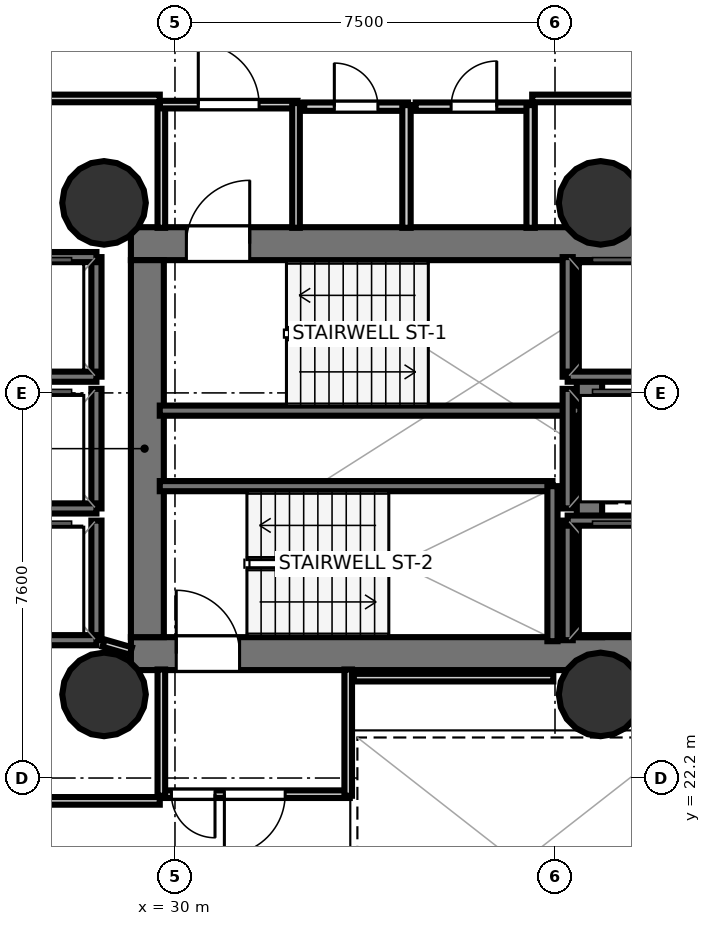
"""IFC4 building model, lengths in metres.
Left out: names, types, materials, properties, quantities, classifications, styles, units other than length and angle.
Written with IfcOpenShell. Run it as: python <this file> out.ifc"""

import sys

from ifc_helpers import new_model, si_unit, direction, frame, frame_2d, origin, origin_2d, place, context, subcontext, project, spatial, rectangle, hollow_circle, extrude, element, fill, save


model = new_model("IFC4")
c1 = context("Model", 3, precision=1e-05, world=origin(), true_north=direction((0.0, 1.0)))
c2 = subcontext(c1, "Body", "Model", "MODEL_VIEW")
j1 = project(units=[si_unit("LENGTHUNIT", "METRE"), si_unit("PLANEANGLEUNIT", "RADIAN")], contexts=[c1])
p1 = place(None, origin())
s1 = spatial("IfcSite", under=j1, at=p1, CompositionType="ELEMENT")
p2 = place(p1, origin())
s2 = spatial("IfcBuilding", under=s1, at=p2, CompositionType="ELEMENT")
p3 = place(p2, frame((0.0, 0.0, 85.8)))
s3 = spatial("IfcBuildingStorey", under=s2, at=p3, CompositionType="ELEMENT", Elevation=85.8)
p4 = place(p3, frame((29.13, 32.745, 0.0), z_axis=(0.0, 0.0, 1.0), x_axis=(1.0, 0.0, 0.0)))
e1 = element("IfcWall", 1, at=p4, inside=s3, PredefinedType="SHEAR", context=c2, shape_type="SweptSolid", body=[
    extrude(rectangle(XDim=10.72, YDim=0.65, at=frame_2d((5.36, 0.0))), origin(), (0.0, 0.0, 1.0), 3.52),
])
p5 = place(p4, frame((1.095, 0.0, 0.0)))
e2 = element("IfcOpeningElement", 2, at=p5, cuts=e1, PredefinedType="OPENING", context=c2, shape_type="SweptSolid", body=[
    extrude(rectangle(XDim=1.25, YDim=2.15, at=frame_2d((0.625, 1.075))), frame((0.0, 0.335, 0.0), z_axis=(0.0, -1.0, 0.0), x_axis=(1.0, 0.0, 0.0)), (0.0, 0.0, 1.0), 0.67),
])
p6 = place(p3, frame((29.13, 24.655, 0.0), z_axis=(0.0, 0.0, 1.0), x_axis=(1.0, 0.0, 0.0)))
e3 = element("IfcWall", 3, at=p6, inside=s3, PredefinedType="SHEAR", context=c2, shape_type="SweptSolid", body=[
    extrude(rectangle(XDim=10.72, YDim=0.65, at=frame_2d((5.36, 0.0))), origin(), (0.0, 0.0, 1.0), 3.52),
])
p7 = place(p6, frame((0.895, 0.0, 0.0)))
e4 = element("IfcOpeningElement", 4, at=p7, cuts=e3, PredefinedType="OPENING", context=c2, shape_type="SweptSolid", body=[
    extrude(rectangle(XDim=1.25, YDim=2.15, at=frame_2d((0.625, 1.075))), frame((0.0, 0.335, 0.0), z_axis=(0.0, -1.0, 0.0), x_axis=(1.0, 0.0, 0.0)), (0.0, 0.0, 1.0), 0.67),
])
p8 = place(p3, frame((29.455, 24.98, 0.0), z_axis=(0.0, 0.0, 1.0), x_axis=(0.0, 1.0, 0.0)))
e5 = element("IfcWall", 5, at=p8, inside=s3, PredefinedType="SHEAR", context=c2, shape_type="SweptSolid", body=[
    extrude(rectangle(XDim=7.44, YDim=0.65, at=frame_2d((3.72, 0.0))), origin(), (0.0, 0.0, 1.0), 3.52),
])
p9 = place(p3, frame((38.18, 24.98, 0.0), z_axis=(0.0, 0.0, 1.0), x_axis=(0.0, 1.0, 0.0)))
e6 = element("IfcWall", 6, at=p9, inside=s3, PredefinedType="SHEAR", context=c2, shape_type="SweptSolid", body=[
    extrude(rectangle(XDim=7.44, YDim=0.5, at=frame_2d((3.72, 0.0))), origin(), (0.0, 0.0, 1.0), 3.52),
])
for number, where, z_axis, x_axis in (
    (7, (28.6, 33.55, 0.0), (0.0, 0.0, 1.0), (1.0, 0.0, 0.0)),
    (8, (28.6, 23.85, 0.0), (0.0, 0.0, 1.0), (1.0, 0.0, 0.0)),
    (9, (38.4, 33.55, 0.0), (0.0, 0.0, 1.0), (1.0, 0.0, 0.0)),
    (10, (38.4, 23.85, 0.0), (0.0, 0.0, 1.0), (1.0, 0.0, 0.0)),
):
    element("IfcColumn", number, at=place(p3, frame(where, z_axis=z_axis, x_axis=x_axis)), inside=s3, PredefinedType="COLUMN", context=c2, shape_type="SweptSolid", body=[
        extrude(hollow_circle(Radius=0.825, WallThickness=0.04, at=origin_2d()), origin(), (0.0, 0.0, 1.0), 3.7),
    ])
p10 = place(p3, frame((29.7, 29.45, 0.0), z_axis=(0.0, 0.0, 1.0), x_axis=(1.0, 0.0, 0.0)))
e11 = element("IfcWall", 11, at=p10, inside=s3, PredefinedType="SOLIDWALL", context=c2, shape_type="SweptSolid", body=[
    extrude(rectangle(XDim=8.3, YDim=0.2, at=frame_2d((4.15, 0.0))), origin(), (0.0, 0.0, 1.0), 3.52),
])
p11 = place(p3, frame((29.7, 27.96, 0.0), z_axis=(0.0, 0.0, 1.0), x_axis=(1.0, 0.0, 0.0)))
e12 = element("IfcWall", 12, at=p11, inside=s3, PredefinedType="SOLIDWALL", context=c2, shape_type="SweptSolid", body=[
    extrude(rectangle(XDim=7.75, YDim=0.2, at=frame_2d((3.875, 0.0))), origin(), (0.0, 0.0, 1.0), 3.52),
])
p12 = place(p3, frame((37.45, 24.9, 0.0), z_axis=(0.0, 0.0, 1.0), x_axis=(0.0, 1.0, 0.0)))
e13 = element("IfcWall", 13, at=p12, inside=s3, PredefinedType="SOLIDWALL", context=c2, shape_type="SweptSolid", body=[
    extrude(rectangle(XDim=3.06, YDim=0.2, at=frame_2d((1.53, 0.0))), origin(), (0.0, 0.0, 1.0), 3.52),
])
p13 = place(p3, frame((37.75, 30.12, 0.0), z_axis=(0.0, 0.0, 1.0), x_axis=(0.0, 1.0, 0.0)))
e14 = element("IfcWall", 14, at=p13, inside=s3, PredefinedType="SOLIDWALL", context=c2, shape_type="SweptSolid", body=[
    extrude(rectangle(XDim=2.36, YDim=0.2, at=frame_2d((1.18, 0.0))), origin(), (0.0, 0.0, 1.0), 3.52),
])
p14 = place(p3, frame((37.75, 30.12, 0.0), z_axis=(0.0, 0.0, 1.0), x_axis=(1.0, 0.0, 0.0)))
e15 = element("IfcWall", 15, at=p14, inside=s3, PredefinedType="SOLIDWALL", context=c2, shape_type="SweptSolid", body=[
    extrude(rectangle(XDim=2.1, YDim=0.2, at=frame_2d((1.05, 0.0))), origin(), (0.0, 0.0, 1.0), 3.52),
])
p15 = place(p3, frame((37.75, 24.92, 0.0), z_axis=(0.0, 0.0, 1.0), x_axis=(0.0, 1.0, 0.0)))
e16 = element("IfcWall", 16, at=p15, inside=s3, PredefinedType="SOLIDWALL", context=c2, shape_type="SweptSolid", body=[
    extrude(rectangle(XDim=2.36, YDim=0.2, at=frame_2d((1.18, 0.0))), origin(), (0.0, 0.0, 1.0), 3.52),
])
p16 = place(p3, frame((37.75, 27.28, 0.0), z_axis=(0.0, 0.0, 1.0), x_axis=(1.0, 0.0, 0.0)))
e17 = element("IfcWall", 17, at=p16, inside=s3, PredefinedType="SOLIDWALL", context=c2, shape_type="SweptSolid", body=[
    extrude(rectangle(XDim=2.1, YDim=0.2, at=frame_2d((1.05, 0.0))), origin(), (0.0, 0.0, 1.0), 3.52),
])
p17 = place(p3, frame((28.45, 30.12, 0.0), z_axis=(0.0, 0.0, 1.0), x_axis=(0.0, 1.0, 0.0)))
e18 = element("IfcWall", 18, at=p17, inside=s3, PredefinedType="SOLIDWALL", context=c2, shape_type="SweptSolid", body=[
    extrude(rectangle(XDim=2.36, YDim=0.2, at=frame_2d((1.18, 0.0))), origin(), (0.0, 0.0, 1.0), 3.52),
])
for number, where, z_axis, x_axis in (
    (19, (26.35, 32.48, 0.0), (0.0, 0.0, 1.0), (1.0, 0.0, 0.0)),
    (20, (26.35, 30.12, 0.0), (0.0, 0.0, 1.0), (1.0, 0.0, 0.0)),
):
    element("IfcWall", number, at=place(p3, frame(where, z_axis=z_axis, x_axis=x_axis)), inside=s3, PredefinedType="SOLIDWALL", context=c2, shape_type="SweptSolid", body=[
        extrude(rectangle(XDim=2.1, YDim=0.2, at=frame_2d((1.05, 0.0))), origin(), (0.0, 0.0, 1.0), 3.52),
    ])
p18 = place(p3, frame((28.45, 27.52, 0.0), z_axis=(0.0, 0.0, 1.0), x_axis=(0.0, 1.0, 0.0)))
e21 = element("IfcWall", 21, at=p18, inside=s3, PredefinedType="SOLIDWALL", context=c2, shape_type="SweptSolid", body=[
    extrude(rectangle(XDim=2.36, YDim=0.2, at=frame_2d((1.18, 0.0))), origin(), (0.0, 0.0, 1.0), 3.52),
])
p19 = place(p3, frame((26.35, 27.52, 0.0), z_axis=(0.0, 0.0, 1.0), x_axis=(1.0, 0.0, 0.0)))
e22 = element("IfcWall", 22, at=p19, inside=s3, PredefinedType="SOLIDWALL", context=c2, shape_type="SweptSolid", body=[
    extrude(rectangle(XDim=2.1, YDim=0.2, at=frame_2d((1.05, 0.0))), origin(), (0.0, 0.0, 1.0), 3.52),
])
p20 = place(p3, frame((28.45, 24.92, 0.0), z_axis=(0.0, 0.0, 1.0), x_axis=(0.0, 1.0, 0.0)))
e23 = element("IfcWall", 23, at=p20, inside=s3, PredefinedType="SOLIDWALL", context=c2, shape_type="SweptSolid", body=[
    extrude(rectangle(XDim=2.36, YDim=0.2, at=frame_2d((1.18, 0.0))), origin(), (0.0, 0.0, 1.0), 3.52),
])
p21 = place(p3, frame((26.35, 24.92, 0.0), z_axis=(0.0, 0.0, 1.0), x_axis=(1.0, 0.0, 0.0)))
e24 = element("IfcWall", 24, at=p21, inside=s3, PredefinedType="SOLIDWALL", context=c2, shape_type="SweptSolid", body=[
    extrude(rectangle(XDim=2.1, YDim=0.2, at=frame_2d((1.05, 0.0))), origin(), (0.0, 0.0, 1.0), 3.52),
])
p22 = place(p3, frame((37.75, 27.52, 0.0), z_axis=(0.0, 0.0, 1.0), x_axis=(0.0, 1.0, 0.0)))
e25 = element("IfcWall", 25, at=p22, inside=s3, PredefinedType="SOLIDWALL", context=c2, shape_type="SweptSolid", body=[
    extrude(rectangle(XDim=2.36, YDim=0.2, at=frame_2d((1.18, 0.0))), origin(), (0.0, 0.0, 1.0), 3.52),
])
p23 = place(p3, frame((29.731, 33.058, 0.0), z_axis=(0.0, 0.0, 1.0), x_axis=(0.0, 1.0, 0.0)))
e26 = element("IfcWall", 26, at=p23, inside=s3, PredefinedType="PARTITIONING", context=c2, shape_type="SweptSolid", body=[
    extrude(rectangle(XDim=2.462, YDim=0.15, at=frame_2d((1.231, 0.0))), origin(), (0.0, 0.0, 1.0), 2.84),
])
p24 = place(p3, frame((29.7, 35.489, 0.0), z_axis=(0.0, 0.0, 1.0), x_axis=(1.0, 0.0, 0.0)))
e27 = element("IfcWall", 27, at=p24, inside=s3, PredefinedType="PARTITIONING", context=c2, shape_type="SweptSolid", body=[
    extrude(rectangle(XDim=2.72, YDim=0.15, at=frame_2d((1.36, 0.0))), origin(), (0.0, 0.0, 1.0), 2.84),
])
p25 = place(p24, frame((0.76, 0.0, 0.0)))
e28 = element("IfcOpeningElement", 28, at=p25, cuts=e27, PredefinedType="OPENING", context=c2, shape_type="SweptSolid", body=[
    extrude(rectangle(XDim=1.2, YDim=2.15, at=frame_2d((0.6, 1.075))), frame((0.0, 0.085, 0.0), z_axis=(0.0, -1.0, 0.0), x_axis=(1.0, 0.0, 0.0)), (0.0, 0.0, 1.0), 0.17),
])
p26 = place(p3, frame((32.389, 35.52, 0.0), z_axis=(0.0, 0.0, 1.0), x_axis=(0.0, -1.0, 0.0)))
e29 = element("IfcWall", 29, at=p26, inside=s3, PredefinedType="PARTITIONING", context=c2, shape_type="SweptSolid", body=[
    extrude(rectangle(XDim=2.462, YDim=0.15, at=frame_2d((1.231, 0.0))), origin(), (0.0, 0.0, 1.0), 2.84),
])
p27 = place(p3, frame((33.45, 21.881, 0.0), z_axis=(0.0, 0.0, 1.0), x_axis=(-1.0, 0.0, 0.0)))
e30 = element("IfcWall", 30, at=p27, inside=s3, PredefinedType="PARTITIONING", context=c2, shape_type="SweptSolid", body=[
    extrude(rectangle(XDim=3.75, YDim=0.15, at=frame_2d((1.875, 0.0))), origin(), (0.0, 0.0, 1.0), 2.84),
])
p28 = place(p27, frame((1.275, 0.0, 0.0)))
e31 = element("IfcOpeningElement", 31, at=p28, cuts=e30, PredefinedType="OPENING", context=c2, shape_type="SweptSolid", body=[
    extrude(rectangle(XDim=1.2, YDim=2.15, at=frame_2d((0.6, 1.075))), frame((0.0, 0.085, 0.0), z_axis=(0.0, -1.0, 0.0), x_axis=(1.0, 0.0, 0.0)), (0.0, 0.0, 1.0), 0.17),
])
p29 = place(p27, frame((2.66, 0.0, 0.0)))
e32 = element("IfcOpeningElement", 32, at=p29, cuts=e30, PredefinedType="OPENING", context=c2, shape_type="SweptSolid", body=[
    extrude(rectangle(XDim=0.86, YDim=2.05, at=frame_2d((0.43, 1.025))), frame((0.0, 0.085, 0.0), z_axis=(0.0, -1.0, 0.0), x_axis=(1.0, 0.0, 0.0)), (0.0, 0.0, 1.0), 0.17),
])
for number, where, z_axis, x_axis in (
    (33, (29.731, 21.85, 0.0), (0.0, 0.0, 1.0), (0.0, 1.0, 0.0)),
    (34, (33.419, 24.342, 0.0), (0.0, 0.0, 1.0), (0.0, -1.0, 0.0)),
):
    element("IfcWall", number, at=place(p3, frame(where, z_axis=z_axis, x_axis=x_axis)), inside=s3, PredefinedType="PARTITIONING", context=c2, shape_type="SweptSolid", body=[
        extrude(rectangle(XDim=2.492, YDim=0.15, at=frame_2d((1.246, 0.0))), origin(), (0.0, 0.0, 1.0), 2.84),
    ])
p30 = place(p3, frame((32.55, 35.449, 0.0), z_axis=(0.0, 0.0, 1.0), x_axis=(1.0, 0.0, 0.0)))
e35 = element("IfcWall", 35, at=p30, inside=s3, PredefinedType="PLUMBINGWALL", context=c2, shape_type="SweptSolid", body=[
    extrude(rectangle(XDim=2.05, YDim=0.165, at=frame_2d((1.025, 0.0))), origin(), (0.0, 0.0, 1.0), 2.84),
])
p31 = place(p30, frame((0.595, 0.0, 0.0)))
e36 = element("IfcOpeningElement", 36, at=p31, cuts=e35, PredefinedType="OPENING", context=c2, shape_type="SweptSolid", body=[
    extrude(rectangle(XDim=0.86, YDim=2.05, at=frame_2d((0.43, 1.025))), frame((0.0, 0.093, 0.0), z_axis=(0.0, -1.0, 0.0), x_axis=(1.0, 0.0, 0.0)), (0.0, 0.0, 1.0), 0.185),
])
p32 = place(p3, frame((34.569, 35.48, 0.0), z_axis=(0.0, 0.0, 1.0), x_axis=(0.0, -1.0, 0.0)))
e37 = element("IfcWall", 37, at=p32, inside=s3, PredefinedType="PLUMBINGWALL", context=c2, shape_type="SweptSolid", body=[
    extrude(rectangle(XDim=2.422, YDim=0.165, at=frame_2d((1.211, 0.0))), origin(), (0.0, 0.0, 1.0), 2.84),
])
p33 = place(p3, frame((34.75, 35.449, 0.0), z_axis=(0.0, 0.0, 1.0), x_axis=(1.0, 0.0, 0.0)))
e38 = element("IfcWall", 38, at=p33, inside=s3, PredefinedType="PLUMBINGWALL", context=c2, shape_type="SweptSolid", body=[
    extrude(rectangle(XDim=2.3, YDim=0.165, at=frame_2d((1.15, 0.0))), origin(), (0.0, 0.0, 1.0), 2.84),
])
p34 = place(p33, frame((0.7, 0.0, 0.0)))
e39 = element("IfcOpeningElement", 39, at=p34, cuts=e38, PredefinedType="OPENING", context=c2, shape_type="SweptSolid", body=[
    extrude(rectangle(XDim=0.9, YDim=2.1, at=frame_2d((0.45, 1.05))), frame((0.0, 0.093, 0.0), z_axis=(0.0, -1.0, 0.0), x_axis=(1.0, 0.0, 0.0)), (0.0, 0.0, 1.0), 0.185),
])
p35 = place(p3, frame((37.019, 35.48, 0.0), z_axis=(0.0, 0.0, 1.0), x_axis=(0.0, -1.0, 0.0)))
e40 = element("IfcWall", 40, at=p35, inside=s3, PredefinedType="PLUMBINGWALL", context=c2, shape_type="SweptSolid", body=[
    extrude(rectangle(XDim=2.422, YDim=0.165, at=frame_2d((1.211, 0.0))), origin(), (0.0, 0.0, 1.0), 2.84),
])
p36 = place(p3, frame((29.13, 24.706, 0.0), z_axis=(0.0, 0.0, 1.0), x_axis=(-0.960451214223, 0.278448316742, 0.0)))
e41 = element("IfcWall", 41, at=p36, inside=s3, PredefinedType="PARTITIONING", context=c2, shape_type="SweptSolid", body=[
    extrude(rectangle(XDim=0.562, YDim=0.15, at=frame_2d((0.281, 0.0))), origin(), (0.0, 0.0, 1.0), 2.84),
])
p37 = place(p3, frame((37.467, 24.181, 0.0), z_axis=(0.0, 0.0, 1.0), x_axis=(-1.0, 0.0, 0.0)))
e42 = element("IfcWall", 42, at=p37, inside=s3, PredefinedType="PARTITIONING", context=c2, shape_type="SweptSolid", body=[
    extrude(rectangle(XDim=3.937, YDim=0.15, at=frame_2d((1.968, 0.0))), origin(), (0.0, 0.0, 1.0), 2.84),
])
p38 = place(p3, frame((39.818, 35.611, 0.0), z_axis=(0.0, 0.0, 1.0), x_axis=(-1.0, 0.0, 0.0)))
e43 = element("IfcWall", 43, at=p38, inside=s3, PredefinedType="PARTITIONING", context=c2, shape_type="SweptSolid", body=[
    extrude(rectangle(XDim=2.768, YDim=0.15, at=frame_2d((1.384, 0.0))), origin(), (0.0, 0.0, 1.0), 2.84),
])
p39 = place(p3, frame((29.7, 35.611, 0.0), z_axis=(0.0, 0.0, 1.0), x_axis=(-1.0, 0.0, 0.0)))
e44 = element("IfcWall", 44, at=p39, inside=s3, PredefinedType="PARTITIONING", context=c2, shape_type="SweptSolid", body=[
    extrude(rectangle(XDim=3.28, YDim=0.15, at=frame_2d((1.64, 0.0))), origin(), (0.0, 0.0, 1.0), 2.798),
])
p40 = place(p3, frame((26.42, 21.749, 0.0), z_axis=(0.0, 0.0, 1.0), x_axis=(1.0, 0.0, 0.0)))
e45 = element("IfcWall", 45, at=p40, inside=s3, PredefinedType="PARTITIONING", context=c2, shape_type="SweptSolid", body=[
    extrude(rectangle(XDim=3.28, YDim=0.15, at=frame_2d((1.64, 0.0))), origin(), (0.0, 0.0, 1.0), 2.84),
])
p41 = place(p5, origin())
e46 = element("IfcDoor", 46, at=p41, inside=s3, OperationType="SINGLE_SWING_RIGHT", PredefinedType="DOOR", context=c2, shape_type="SweptSolid", body=[
    extrude(rectangle(XDim=1.25, YDim=2.15, at=frame_2d((0.625, 1.075))), frame((0.0, 0.025, 0.0), z_axis=(0.0, -1.0, 0.0), x_axis=(1.0, 0.0, 0.0)), (0.0, 0.0, 1.0), 0.05),
])
fill(e2, e46)
p42 = place(p7, origin())
e47 = element("IfcDoor", 47, at=p42, inside=s3, OperationType="SINGLE_SWING_LEFT", PredefinedType="DOOR", context=c2, shape_type="SweptSolid", body=[
    extrude(rectangle(XDim=1.25, YDim=2.15, at=frame_2d((0.625, 1.075))), frame((0.0, 0.025, 0.0), z_axis=(0.0, -1.0, 0.0), x_axis=(1.0, 0.0, 0.0)), (0.0, 0.0, 1.0), 0.05),
])
fill(e4, e47)
p43 = place(p25, origin())
e48 = element("IfcDoor", 48, at=p43, inside=s3, OperationType="SINGLE_SWING_LEFT", PredefinedType="DOOR", context=c2, shape_type="SweptSolid", body=[
    extrude(rectangle(XDim=1.2, YDim=2.15, at=frame_2d((0.6, 1.075))), frame((0.0, 0.025, 0.0), z_axis=(0.0, -1.0, 0.0), x_axis=(1.0, 0.0, 0.0)), (0.0, 0.0, 1.0), 0.05),
])
fill(e28, e48)
p44 = place(p28, origin())
e49 = element("IfcDoor", 49, at=p44, inside=s3, OperationType="SINGLE_SWING_RIGHT", PredefinedType="DOOR", context=c2, shape_type="SweptSolid", body=[
    extrude(rectangle(XDim=1.2, YDim=2.15, at=frame_2d((0.6, 1.075))), frame((0.0, 0.025, 0.0), z_axis=(0.0, -1.0, 0.0), x_axis=(1.0, 0.0, 0.0)), (0.0, 0.0, 1.0), 0.05),
])
fill(e31, e49)
p45 = place(p31, origin())
e50 = element("IfcDoor", 50, at=p45, inside=s3, OperationType="SINGLE_SWING_LEFT", PredefinedType="DOOR", context=c2, shape_type="SweptSolid", body=[
    extrude(rectangle(XDim=0.86, YDim=2.05, at=frame_2d((0.43, 1.025))), frame((0.0, 0.025, 0.0), z_axis=(0.0, -1.0, 0.0), x_axis=(1.0, 0.0, 0.0)), (0.0, 0.0, 1.0), 0.05),
])
fill(e36, e50)
p46 = place(p34, origin())
e51 = element("IfcDoor", 51, at=p46, inside=s3, OperationType="SINGLE_SWING_RIGHT", PredefinedType="DOOR", context=c2, shape_type="SweptSolid", body=[
    extrude(rectangle(XDim=0.9, YDim=2.1, at=frame_2d((0.45, 1.05))), frame((0.0, 0.025, 0.0), z_axis=(0.0, -1.0, 0.0), x_axis=(1.0, 0.0, 0.0)), (0.0, 0.0, 1.0), 0.05),
])
fill(e39, e51)
p47 = place(p29, origin())
e52 = element("IfcDoor", 52, at=p47, inside=s3, OperationType="SINGLE_SWING_LEFT", PredefinedType="DOOR", context=c2, shape_type="SweptSolid", body=[
    extrude(rectangle(XDim=0.86, YDim=2.05, at=frame_2d((0.43, 1.025))), frame((0.0, 0.025, 0.0), z_axis=(0.0, -1.0, 0.0), x_axis=(1.0, 0.0, 0.0)), (0.0, 0.0, 1.0), 0.05),
])
fill(e32, e52)
save(model, sys.argv[1])
